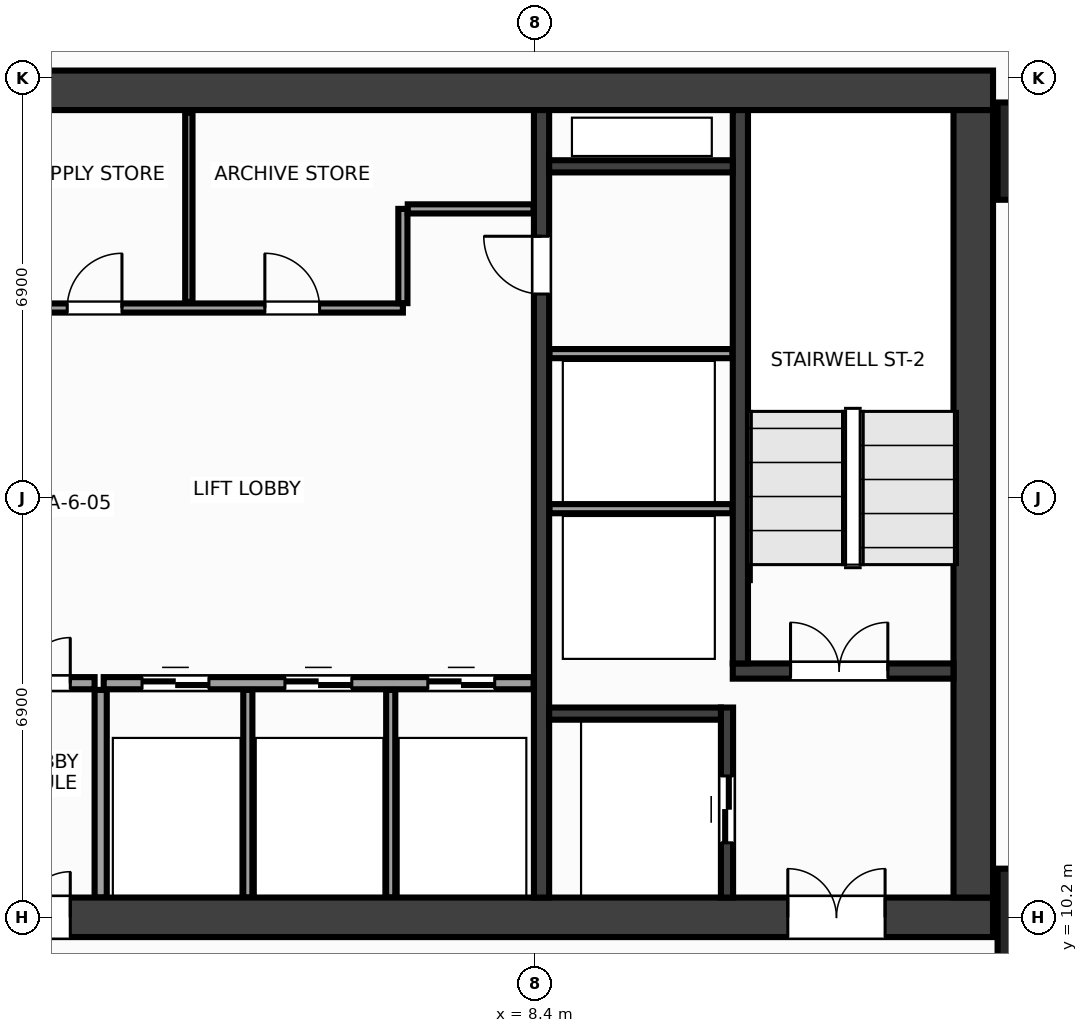
"""IFC4 building model, lengths in metres.
Left out: names, types, materials, properties, quantities, classifications, styles, units other than length and angle.
Written with IfcOpenShell. Run it as: python <this file> out.ifc"""

import sys

from ifc_helpers import new_model, si_unit, direction, frame, frame_2d, origin, origin_2d, place, context, subcontext, project, spatial, rectangle, extrude, source, transform, mapped, element, fill, save


model = new_model("IFC4")
c1 = context("Model", 3, precision=1e-05, world=origin(), true_north=direction((0.0, 1.0)))
c2 = subcontext(c1, "Body", "Model", "MODEL_VIEW")
j1 = project(units=[si_unit("LENGTHUNIT", "METRE"), si_unit("PLANEANGLEUNIT", "RADIAN")], contexts=[c1])
p1 = place(None, origin())
s1 = spatial("IfcSite", under=j1, at=p1, CompositionType="ELEMENT")
p2 = place(p1, origin())
s2 = spatial("IfcBuilding", under=s1, at=p2, CompositionType="ELEMENT")
p3 = place(p2, frame((0.0, 0.0, 185.6)))
s3 = spatial("IfcBuildingStorey", under=s2, at=p3, CompositionType="ELEMENT", Elevation=185.6)
m1 = source(origin(), c2, "Body", "SweptSolid", [
    extrude(rectangle(XDim=31.85, YDim=0.65, at=frame_2d((15.925, 0.0))), origin(), (0.0, 0.0, 1.0), 3.6),
])
p4 = place(p3, frame((-15.925, 23.8, 0.0), z_axis=(0.0, 0.0, 1.0), x_axis=(1.0, 0.0, 0.0)))
e1 = element("IfcWall", 1, at=p4, inside=s3, PredefinedType="SHEAR", context=c2, shape_type="MappedRepresentation", body=[
    mapped(m1, transform((0.0, 0.0, 0.0), x_axis=(1.0, 0.0, 0.0), y_axis=(0.0, 1.0, 0.0), z_axis=(0.0, 0.0, 1.0), scale=1.0)),
])
p5 = place(p3, frame((-15.925, 10.2, 0.0), z_axis=(0.0, 0.0, 1.0), x_axis=(1.0, 0.0, 0.0)))
e2 = element("IfcWall", 2, at=p5, inside=s3, PredefinedType="SHEAR", context=c2, shape_type="MappedRepresentation", body=[
    mapped(m1, transform((0.0, 0.0, 0.0), x_axis=(1.0, 0.0, 0.0), y_axis=(0.0, 1.0, 0.0), z_axis=(0.0, 0.0, 1.0), scale=1.0)),
])
p6 = place(p5, frame((1.775, 0.0, 0.0)))
e3 = element("IfcOpeningElement", 3, at=p6, cuts=e2, PredefinedType="OPENING", context=c2, shape_type="SweptSolid", body=[
    extrude(rectangle(XDim=1.6, YDim=2.15, at=frame_2d((0.8, 1.075))), frame((0.0, 0.337, 0.0), z_axis=(0.0, -1.0, 0.0), x_axis=(1.0, 0.0, 0.0)), (0.0, 0.0, 1.0), 0.674),
])
p7 = place(p5, frame((28.475, 0.0, 0.0)))
e4 = element("IfcOpeningElement", 4, at=p7, cuts=e2, PredefinedType="OPENING", context=c2, shape_type="SweptSolid", body=[
    extrude(rectangle(XDim=1.6, YDim=2.15, at=frame_2d((0.8, 1.075))), frame((0.0, 0.337, 0.0), z_axis=(0.0, -1.0, 0.0), x_axis=(1.0, 0.0, 0.0)), (0.0, 0.0, 1.0), 0.674),
])
p8 = place(p5, frame((15.175, 0.0, 0.0)))
e5 = element("IfcOpeningElement", 5, at=p8, cuts=e2, PredefinedType="OPENING", context=c2, shape_type="SweptSolid", body=[
    extrude(rectangle(XDim=1.5, YDim=2.2, at=frame_2d((0.75, 1.1))), frame((0.0, 0.337, 0.0), z_axis=(0.0, -1.0, 0.0), x_axis=(1.0, 0.0, 0.0)), (0.0, 0.0, 1.0), 0.674),
])
m2 = source(origin(), c2, "Body", "SweptSolid", [
    extrude(rectangle(XDim=12.95, YDim=0.65, at=frame_2d((6.475, 0.0))), origin(), (0.0, 0.0, 1.0), 3.6),
])
p9 = place(p3, frame((15.6, 10.525, 0.0), z_axis=(0.0, 0.0, 1.0), x_axis=(0.0, 1.0, 0.0)))
e6 = element("IfcWall", 6, at=p9, inside=s3, PredefinedType="SHEAR", context=c2, shape_type="MappedRepresentation", body=[
    mapped(m2, transform((0.0, 0.0, 0.0), x_axis=(1.0, 0.0, 0.0), y_axis=(0.0, 1.0, 0.0), z_axis=(0.0, 0.0, 1.0), scale=1.0)),
])
m3 = source(origin(), c2, "Body", "SweptSolid", [
    extrude(rectangle(XDim=12.95, YDim=0.25, at=frame_2d((6.475, 0.0))), origin(), (0.0, 0.0, 1.0), 3.6),
])
p10 = place(p3, frame((8.5, 10.525, 0.0), z_axis=(0.0, 0.0, 1.0), x_axis=(0.0, 1.0, 0.0)))
e7 = element("IfcWall", 7, at=p10, inside=s3, PredefinedType="SHEAR", context=c2, shape_type="MappedRepresentation", body=[
    mapped(m3, transform((0.0, 0.0, 0.0), x_axis=(1.0, 0.0, 0.0), y_axis=(0.0, 1.0, 0.0), z_axis=(0.0, 0.0, 1.0), scale=1.0)),
])
p11 = place(p10, frame((9.925, 0.0, 0.0)))
e8 = element("IfcOpeningElement", 8, at=p11, cuts=e7, PredefinedType="OPENING", context=c2, shape_type="SweptSolid", body=[
    extrude(rectangle(XDim=0.95, YDim=2.15, at=frame_2d((0.475, 1.075))), frame((0.0, 0.137, 0.0), z_axis=(0.0, -1.0, 0.0), x_axis=(1.0, 0.0, 0.0)), (0.0, 0.0, 1.0), 0.274),
])
m4 = source(origin(), c2, "Body", "SweptSolid", [
    extrude(rectangle(XDim=3.63, YDim=0.25, at=frame_2d((1.815, 0.0))), origin(), (0.0, 0.0, 1.0), 3.6),
])
p12 = place(p3, frame((11.645, 14.25, 0.0), z_axis=(0.0, 0.0, 1.0), x_axis=(1.0, 0.0, 0.0)))
e9 = element("IfcWall", 9, at=p12, inside=s3, PredefinedType="SHEAR", context=c2, shape_type="MappedRepresentation", body=[
    mapped(m4, transform((0.0, 0.0, 0.0), x_axis=(1.0, 0.0, 0.0), y_axis=(0.0, 1.0, 0.0), z_axis=(0.0, 0.0, 1.0), scale=1.0)),
])
p13 = place(p12, frame((0.95, 0.0, 0.0)))
e10 = element("IfcOpeningElement", 10, at=p13, cuts=e9, PredefinedType="OPENING", context=c2, shape_type="SweptSolid", body=[
    extrude(rectangle(XDim=1.6, YDim=2.15, at=frame_2d((0.8, 1.075))), frame((0.0, 0.137, 0.0), z_axis=(0.0, -1.0, 0.0), x_axis=(1.0, 0.0, 0.0)), (0.0, 0.0, 1.0), 0.274),
])
m5 = source(origin(), c2, "Body", "SweptSolid", [
    extrude(rectangle(XDim=9.1, YDim=0.25, at=frame_2d((4.55, 0.0))), origin(), (0.0, 0.0, 1.0), 3.6),
])
p14 = place(p3, frame((11.77, 14.375, 0.0), z_axis=(0.0, 0.0, 1.0), x_axis=(0.0, 1.0, 0.0)))
e11 = element("IfcWall", 11, at=p14, inside=s3, PredefinedType="SHEAR", context=c2, shape_type="MappedRepresentation", body=[
    mapped(m5, transform((0.0, 0.0, 0.0), x_axis=(1.0, 0.0, 0.0), y_axis=(0.0, 1.0, 0.0), z_axis=(0.0, 0.0, 1.0), scale=1.0)),
])
m6 = source(origin(), c2, "Body", "SweptSolid", [
    extrude(rectangle(XDim=3.125, YDim=0.2, at=frame_2d((1.562, 0.0))), origin(), (0.0, 0.0, 1.0), 3.6),
])
p15 = place(p3, frame((11.55, 10.525, 0.0), z_axis=(0.0, 0.0, 1.0), x_axis=(0.0, 1.0, 0.0)))
e12 = element("IfcWall", 12, at=p15, inside=s3, PredefinedType="SHEAR", context=c2, shape_type="MappedRepresentation", body=[
    mapped(m6, transform((0.0, 0.0, 0.0), x_axis=(1.0, 0.0, 0.0), y_axis=(0.0, 1.0, 0.0), z_axis=(0.0, 0.0, 1.0), scale=1.0)),
])
p16 = place(p15, frame((0.9, 0.0, 0.0)))
e13 = element("IfcOpeningElement", 13, at=p16, cuts=e12, PredefinedType="OPENING", context=c2, shape_type="SweptSolid", body=[
    extrude(rectangle(XDim=1.1, YDim=2.15, at=frame_2d((0.55, 1.075))), frame((0.0, 0.112, 0.0), z_axis=(0.0, -1.0, 0.0), x_axis=(1.0, 0.0, 0.0)), (0.0, 0.0, 1.0), 0.224),
])
m7 = source(origin(), c2, "Body", "SweptSolid", [
    extrude(rectangle(XDim=2.825, YDim=0.2, at=frame_2d((1.413, 0.0))), origin(), (0.0, 0.0, 1.0), 3.6),
])
p17 = place(p3, frame((8.625, 13.55, 0.0), z_axis=(0.0, 0.0, 1.0), x_axis=(1.0, 0.0, 0.0)))
e14 = element("IfcWall", 14, at=p17, inside=s3, PredefinedType="SHEAR", context=c2, shape_type="MappedRepresentation", body=[
    mapped(m7, transform((0.0, 0.0, 0.0), x_axis=(1.0, 0.0, 0.0), y_axis=(0.0, 1.0, 0.0), z_axis=(0.0, 0.0, 1.0), scale=1.0)),
])
m8 = source(origin(), c2, "Body", "SweptSolid", [
    extrude(rectangle(XDim=3.02, YDim=0.2, at=frame_2d((1.51, 0.0))), origin(), (0.0, 0.0, 1.0), 3.6),
])
p18 = place(p3, frame((8.625, 22.55, 0.0), z_axis=(0.0, 0.0, 1.0), x_axis=(1.0, 0.0, 0.0)))
e15 = element("IfcWall", 15, at=p18, inside=s3, PredefinedType="SHEAR", context=c2, shape_type="MappedRepresentation", body=[
    mapped(m8, transform((0.0, 0.0, 0.0), x_axis=(1.0, 0.0, 0.0), y_axis=(0.0, 1.0, 0.0), z_axis=(0.0, 0.0, 1.0), scale=1.0)),
])
m9 = source(origin(), c2, "Body", "SweptSolid", [
    extrude(rectangle(XDim=1.6, YDim=1.6, at=origin_2d()), origin(), (0.0, 0.0, 1.0), 3.6),
])
for number, where, z_axis, x_axis in (
    (16, (16.8, 10.2, 0.0), (0.0, 0.0, 1.0), (1.0, 0.0, 0.0)),
    (17, (16.8, 22.8, 0.0), (0.0, 0.0, 1.0), (1.0, 0.0, 0.0)),
):
    element("IfcColumn", number, at=place(p3, frame(where, z_axis=z_axis, x_axis=x_axis)), inside=s3, PredefinedType="COLUMN", context=c2, shape_type="MappedRepresentation", body=[
        mapped(m9, transform((0.0, 0.0, 0.0), x_axis=(1.0, 0.0, 0.0), y_axis=(0.0, 1.0, 0.0), z_axis=(0.0, 0.0, 1.0), scale=1.0)),
    ])
m10 = source(origin(), c2, "Body", "SweptSolid", [
    extrude(rectangle(XDim=3.01, YDim=0.15, at=frame_2d((1.505, 0.0))), origin(), (0.0, 0.0, 1.0), 3.3),
])
for number, where, z_axis, x_axis in (
    (18, (8.63, 16.92, 0.0), (0.0, 0.0, 1.0), (1.0, 0.0, 0.0)),
    (19, (8.63, 19.47, 0.0), (0.0, 0.0, 1.0), (1.0, 0.0, 0.0)),
):
    element("IfcWall", number, at=place(p3, frame(where, z_axis=z_axis, x_axis=x_axis)), inside=s3, PredefinedType="PARTITIONING", context=c2, shape_type="MappedRepresentation", body=[
        mapped(m10, transform((0.0, 0.0, 0.0), x_axis=(1.0, 0.0, 0.0), y_axis=(0.0, 1.0, 0.0), z_axis=(0.0, 0.0, 1.0), scale=1.0)),
    ])
m11 = source(origin(), c2, "Body", "SweptSolid", [
    extrude(rectangle(XDim=7.07, YDim=0.2, at=frame_2d((3.535, 0.0))), origin(), (0.0, 0.0, 1.0), 3.3),
])
p19 = place(p3, frame((1.3, 14.05, 0.0), z_axis=(0.0, 0.0, 1.0), x_axis=(1.0, 0.0, 0.0)))
e20 = element("IfcWall", 20, at=p19, inside=s3, PredefinedType="PARTITIONING", context=c2, shape_type="MappedRepresentation", body=[
    mapped(m11, transform((0.0, 0.0, 0.0), x_axis=(1.0, 0.0, 0.0), y_axis=(0.0, 1.0, 0.0), z_axis=(0.0, 0.0, 1.0), scale=1.0)),
])
p20 = place(p19, frame((0.63, 0.0, 0.0)))
e21 = element("IfcOpeningElement", 21, at=p20, cuts=e20, PredefinedType="OPENING", context=c2, shape_type="SweptSolid", body=[
    extrude(rectangle(XDim=1.1, YDim=2.15, at=frame_2d((0.55, 1.075))), frame((0.0, 0.112, 0.0), z_axis=(0.0, -1.0, 0.0), x_axis=(1.0, 0.0, 0.0)), (0.0, 0.0, 1.0), 0.224),
])
p21 = place(p19, frame((2.98, 0.0, 0.0)))
e22 = element("IfcOpeningElement", 22, at=p21, cuts=e20, PredefinedType="OPENING", context=c2, shape_type="SweptSolid", body=[
    extrude(rectangle(XDim=1.1, YDim=2.15, at=frame_2d((0.55, 1.075))), frame((0.0, 0.112, 0.0), z_axis=(0.0, -1.0, 0.0), x_axis=(1.0, 0.0, 0.0)), (0.0, 0.0, 1.0), 0.224),
])
p22 = place(p19, frame((5.33, 0.0, 0.0)))
e23 = element("IfcOpeningElement", 23, at=p22, cuts=e20, PredefinedType="OPENING", context=c2, shape_type="SweptSolid", body=[
    extrude(rectangle(XDim=1.1, YDim=2.15, at=frame_2d((0.55, 1.075))), frame((0.0, 0.112, 0.0), z_axis=(0.0, -1.0, 0.0), x_axis=(1.0, 0.0, 0.0)), (0.0, 0.0, 1.0), 0.224),
])
m12 = source(origin(), c2, "Body", "SweptSolid", [
    extrude(rectangle(XDim=3.415, YDim=0.2, at=frame_2d((1.708, 0.0))), origin(), (0.0, 0.0, 1.0), 3.3),
])
p23 = place(p3, frame((1.25, 10.525, 0.0), z_axis=(0.0, 0.0, 1.0), x_axis=(0.0, 1.0, 0.0)))
e24 = element("IfcWall", 24, at=p23, inside=s3, PredefinedType="PARTITIONING", context=c2, shape_type="MappedRepresentation", body=[
    mapped(m12, transform((0.0, 0.0, 0.0), x_axis=(1.0, 0.0, 0.0), y_axis=(0.0, 1.0, 0.0), z_axis=(0.0, 0.0, 1.0), scale=1.0)),
])
m13 = source(origin(), c2, "Body", "SweptSolid", [
    extrude(rectangle(XDim=2.3, YDim=0.2, at=frame_2d((1.15, 0.0))), origin(), (0.0, 0.0, 1.0), 3.3),
])
p24 = place(p3, frame((-1.15, 14.05, 0.0), z_axis=(0.0, 0.0, 1.0), x_axis=(1.0, 0.0, 0.0)))
e25 = element("IfcWall", 25, at=p24, inside=s3, PredefinedType="PARTITIONING", context=c2, shape_type="MappedRepresentation", body=[
    mapped(m13, transform((0.0, 0.0, 0.0), x_axis=(1.0, 0.0, 0.0), y_axis=(0.0, 1.0, 0.0), z_axis=(0.0, 0.0, 1.0), scale=1.0)),
])
p25 = place(p24, frame((0.4, 0.0, 0.0)))
e26 = element("IfcOpeningElement", 26, at=p25, cuts=e25, PredefinedType="OPENING", context=c2, shape_type="SweptSolid", body=[
    extrude(rectangle(XDim=1.5, YDim=2.2, at=frame_2d((0.75, 1.1))), frame((0.0, 0.112, 0.0), z_axis=(0.0, -1.0, 0.0), x_axis=(1.0, 0.0, 0.0)), (0.0, 0.0, 1.0), 0.224),
])
m14 = source(origin(), c2, "Body", "SweptSolid", [
    extrude(rectangle(XDim=14.59, YDim=0.15, at=frame_2d((7.295, 0.0))), origin(), (0.0, 0.0, 1.0), 3.3),
])
p26 = place(p3, frame((-8.37, 20.22, 0.0), z_axis=(0.0, 0.0, 1.0), x_axis=(1.0, 0.0, 0.0)))
e27 = element("IfcWall", 27, at=p26, inside=s3, PredefinedType="PARTITIONING", context=c2, shape_type="MappedRepresentation", body=[
    mapped(m14, transform((0.0, 0.0, 0.0), x_axis=(1.0, 0.0, 0.0), y_axis=(0.0, 1.0, 0.0), z_axis=(0.0, 0.0, 1.0), scale=1.0)),
])
p27 = place(p26, frame((0.86, 0.0, 0.0)))
e28 = element("IfcOpeningElement", 28, at=p27, cuts=e27, PredefinedType="OPENING", context=c2, shape_type="SweptSolid", body=[
    extrude(rectangle(XDim=0.9, YDim=2.15, at=frame_2d((0.45, 1.075))), frame((0.0, 0.087, 0.0), z_axis=(0.0, -1.0, 0.0), x_axis=(1.0, 0.0, 0.0)), (0.0, 0.0, 1.0), 0.174),
])
p28 = place(p26, frame((3.47, 0.0, 0.0)))
e29 = element("IfcOpeningElement", 29, at=p28, cuts=e27, PredefinedType="OPENING", context=c2, shape_type="SweptSolid", body=[
    extrude(rectangle(XDim=0.9, YDim=2.15, at=frame_2d((0.45, 1.075))), frame((0.0, 0.087, 0.0), z_axis=(0.0, -1.0, 0.0), x_axis=(1.0, 0.0, 0.0)), (0.0, 0.0, 1.0), 0.174),
])
p29 = place(p26, frame((6.17, 0.0, 0.0)))
e30 = element("IfcOpeningElement", 30, at=p29, cuts=e27, PredefinedType="OPENING", context=c2, shape_type="SweptSolid", body=[
    extrude(rectangle(XDim=0.9, YDim=2.15, at=frame_2d((0.45, 1.075))), frame((0.0, 0.087, 0.0), z_axis=(0.0, -1.0, 0.0), x_axis=(1.0, 0.0, 0.0)), (0.0, 0.0, 1.0), 0.174),
])
p30 = place(p26, frame((9.07, 0.0, 0.0)))
e31 = element("IfcOpeningElement", 31, at=p30, cuts=e27, PredefinedType="OPENING", context=c2, shape_type="SweptSolid", body=[
    extrude(rectangle(XDim=0.9, YDim=2.15, at=frame_2d((0.45, 1.075))), frame((0.0, 0.087, 0.0), z_axis=(0.0, -1.0, 0.0), x_axis=(1.0, 0.0, 0.0)), (0.0, 0.0, 1.0), 0.174),
])
p31 = place(p26, frame((12.32, 0.0, 0.0)))
e32 = element("IfcOpeningElement", 32, at=p31, cuts=e27, PredefinedType="OPENING", context=c2, shape_type="SweptSolid", body=[
    extrude(rectangle(XDim=0.9, YDim=2.15, at=frame_2d((0.45, 1.075))), frame((0.0, 0.087, 0.0), z_axis=(0.0, -1.0, 0.0), x_axis=(1.0, 0.0, 0.0)), (0.0, 0.0, 1.0), 0.174),
])
m15 = source(origin(), c2, "Body", "SweptSolid", [
    extrude(rectangle(XDim=1.55, YDim=0.15, at=frame_2d((0.775, 0.0))), origin(), (0.0, 0.0, 1.0), 3.3),
])
p32 = place(p3, frame((6.22, 20.3, 0.0), z_axis=(0.0, 0.0, 1.0), x_axis=(0.0, 1.0, 0.0)))
e33 = element("IfcWall", 33, at=p32, inside=s3, PredefinedType="PARTITIONING", context=c2, shape_type="MappedRepresentation", body=[
    mapped(m15, transform((0.0, 0.0, 0.0), x_axis=(1.0, 0.0, 0.0), y_axis=(0.0, 1.0, 0.0), z_axis=(0.0, 0.0, 1.0), scale=1.0)),
])
m16 = source(origin(), c2, "Body", "SweptSolid", [
    extrude(rectangle(XDim=2.07, YDim=0.15, at=frame_2d((1.035, 0.0))), origin(), (0.0, 0.0, 1.0), 3.3),
])
p33 = place(p3, frame((6.3, 21.85, 0.0), z_axis=(0.0, 0.0, 1.0), x_axis=(1.0, 0.0, 0.0)))
e34 = element("IfcWall", 34, at=p33, inside=s3, PredefinedType="PARTITIONING", context=c2, shape_type="MappedRepresentation", body=[
    mapped(m16, transform((0.0, 0.0, 0.0), x_axis=(1.0, 0.0, 0.0), y_axis=(0.0, 1.0, 0.0), z_axis=(0.0, 0.0, 1.0), scale=1.0)),
])
m17 = source(origin(), c2, "Body", "SweptSolid", [
    extrude(rectangle(XDim=3.415, YDim=0.15, at=frame_2d((1.708, 0.0))), origin(), (0.0, 0.0, 1.0), 3.3),
])
for number, where, z_axis, x_axis in (
    (35, (3.67, 10.525, 0.0), (0.0, 0.0, 1.0), (0.0, 1.0, 0.0)),
    (36, (6.02, 10.525, 0.0), (0.0, 0.0, 1.0), (0.0, 1.0, 0.0)),
):
    element("IfcWall", number, at=place(p3, frame(where, z_axis=z_axis, x_axis=x_axis)), inside=s3, PredefinedType="PARTITIONING", context=c2, shape_type="MappedRepresentation", body=[
        mapped(m17, transform((0.0, 0.0, 0.0), x_axis=(1.0, 0.0, 0.0), y_axis=(0.0, 1.0, 0.0), z_axis=(0.0, 0.0, 1.0), scale=1.0)),
    ])
m18 = source(origin(), c2, "Body", "SweptSolid", [
    extrude(rectangle(XDim=3.115, YDim=0.12, at=frame_2d((1.558, 0.0))), origin(), (0.0, 0.0, 1.0), 3.3),
])
p34 = place(p3, frame((2.7, 20.32, 0.0), z_axis=(0.0, 0.0, 1.0), x_axis=(0.0, 1.0, 0.0)))
e37 = element("IfcWall", 37, at=p34, inside=s3, PredefinedType="PARTITIONING", context=c2, shape_type="MappedRepresentation", body=[
    mapped(m18, transform((0.0, 0.0, 0.0), x_axis=(1.0, 0.0, 0.0), y_axis=(0.0, 1.0, 0.0), z_axis=(0.0, 0.0, 1.0), scale=1.0)),
])
m19 = source(origin(), c2, "Body", "SweptSolid", [
    extrude(rectangle(XDim=1.6, YDim=2.15, at=frame_2d((0.8, 1.075))), frame((0.0, 0.025, 0.0), z_axis=(0.0, -1.0, 0.0), x_axis=(1.0, 0.0, 0.0)), (0.0, 0.0, 1.0), 0.05),
])
p35 = place(p13, origin())
e38 = element("IfcDoor", 38, at=p35, inside=s3, OperationType="DOUBLE_DOOR_SINGLE_SWING", PredefinedType="DOOR", context=c2, shape_type="MappedRepresentation", body=[
    mapped(m19, transform((0.0, 0.0, 0.0), x_axis=(1.0, 0.0, 0.0), y_axis=(0.0, 1.0, 0.0), z_axis=(0.0, 0.0, 1.0), scale=1.0)),
])
fill(e10, e38)
p36 = place(p7, origin())
e39 = element("IfcDoor", 39, at=p36, inside=s3, OperationType="DOUBLE_DOOR_SINGLE_SWING", PredefinedType="DOOR", context=c2, shape_type="MappedRepresentation", body=[
    mapped(m19, transform((0.0, 0.0, 0.0), x_axis=(1.0, 0.0, 0.0), y_axis=(0.0, 1.0, 0.0), z_axis=(0.0, 0.0, 1.0), scale=1.0)),
])
fill(e4, e39)
m20 = source(origin(), c2, "Body", "SweptSolid", [
    extrude(rectangle(XDim=1.1, YDim=2.15, at=frame_2d((0.55, 1.075))), frame((0.0, 0.025, 0.0), z_axis=(0.0, -1.0, 0.0), x_axis=(1.0, 0.0, 0.0)), (0.0, 0.0, 1.0), 0.05),
])
p37 = place(p16, origin())
e40 = element("IfcDoor", 40, at=p37, inside=s3, OperationType="DOUBLE_DOOR_SLIDING", PredefinedType="DOOR", context=c2, shape_type="MappedRepresentation", body=[
    mapped(m20, transform((0.0, 0.0, 0.0), x_axis=(1.0, 0.0, 0.0), y_axis=(0.0, 1.0, 0.0), z_axis=(0.0, 0.0, 1.0), scale=1.0)),
])
fill(e13, e40)
m21 = source(origin(), c2, "Body", "SweptSolid", [
    extrude(rectangle(XDim=0.95, YDim=2.15, at=frame_2d((0.475, 1.075))), frame((0.0, 0.025, 0.0), z_axis=(0.0, -1.0, 0.0), x_axis=(1.0, 0.0, 0.0)), (0.0, 0.0, 1.0), 0.05),
])
p38 = place(p11, origin())
e41 = element("IfcDoor", 41, at=p38, inside=s3, OperationType="SINGLE_SWING_RIGHT", PredefinedType="DOOR", context=c2, shape_type="MappedRepresentation", body=[
    mapped(m21, transform((0.0, 0.0, 0.0), x_axis=(1.0, 0.0, 0.0), y_axis=(0.0, 1.0, 0.0), z_axis=(0.0, 0.0, 1.0), scale=1.0)),
])
fill(e8, e41)
p39 = place(p20, origin())
e42 = element("IfcDoor", 42, at=p39, inside=s3, OperationType="DOUBLE_DOOR_SLIDING", PredefinedType="DOOR", context=c2, shape_type="MappedRepresentation", body=[
    mapped(m20, transform((0.0, 0.0, 0.0), x_axis=(1.0, 0.0, 0.0), y_axis=(0.0, 1.0, 0.0), z_axis=(0.0, 0.0, 1.0), scale=1.0)),
])
fill(e21, e42)
p40 = place(p21, origin())
e43 = element("IfcDoor", 43, at=p40, inside=s3, OperationType="DOUBLE_DOOR_SLIDING", PredefinedType="DOOR", context=c2, shape_type="MappedRepresentation", body=[
    mapped(m20, transform((0.0, 0.0, 0.0), x_axis=(1.0, 0.0, 0.0), y_axis=(0.0, 1.0, 0.0), z_axis=(0.0, 0.0, 1.0), scale=1.0)),
])
fill(e22, e43)
p41 = place(p22, origin())
e44 = element("IfcDoor", 44, at=p41, inside=s3, OperationType="DOUBLE_DOOR_SLIDING", PredefinedType="DOOR", context=c2, shape_type="MappedRepresentation", body=[
    mapped(m20, transform((0.0, 0.0, 0.0), x_axis=(1.0, 0.0, 0.0), y_axis=(0.0, 1.0, 0.0), z_axis=(0.0, 0.0, 1.0), scale=1.0)),
])
fill(e23, e44)
m22 = source(origin(), c2, "Body", "SweptSolid", [
    extrude(rectangle(XDim=1.5, YDim=2.2, at=frame_2d((0.75, 1.1))), frame((0.0, 0.025, 0.0), z_axis=(0.0, -1.0, 0.0), x_axis=(1.0, 0.0, 0.0)), (0.0, 0.0, 1.0), 0.05),
])
p42 = place(p25, origin())
e45 = element("IfcDoor", 45, at=p42, inside=s3, OperationType="DOUBLE_DOOR_SINGLE_SWING", PredefinedType="DOOR", context=c2, shape_type="MappedRepresentation", body=[
    mapped(m22, transform((0.0, 0.0, 0.0), x_axis=(1.0, 0.0, 0.0), y_axis=(0.0, 1.0, 0.0), z_axis=(0.0, 0.0, 1.0), scale=1.0)),
])
fill(e26, e45)
p43 = place(p8, origin())
e46 = element("IfcDoor", 46, at=p43, inside=s3, OperationType="DOUBLE_DOOR_SINGLE_SWING", PredefinedType="DOOR", context=c2, shape_type="MappedRepresentation", body=[
    mapped(m22, transform((0.0, 0.0, 0.0), x_axis=(1.0, 0.0, 0.0), y_axis=(0.0, 1.0, 0.0), z_axis=(0.0, 0.0, 1.0), scale=1.0)),
])
fill(e5, e46)
m23 = source(origin(), c2, "Body", "SweptSolid", [
    extrude(rectangle(XDim=0.9, YDim=2.15, at=frame_2d((0.45, 1.075))), frame((0.0, 0.025, 0.0), z_axis=(0.0, -1.0, 0.0), x_axis=(1.0, 0.0, 0.0)), (0.0, 0.0, 1.0), 0.05),
])
p44 = place(p30, origin())
e47 = element("IfcDoor", 47, at=p44, inside=s3, OperationType="SINGLE_SWING_RIGHT", PredefinedType="DOOR", context=c2, shape_type="MappedRepresentation", body=[
    mapped(m23, transform((0.0, 0.0, 0.0), x_axis=(1.0, 0.0, 0.0), y_axis=(0.0, 1.0, 0.0), z_axis=(0.0, 0.0, 1.0), scale=1.0)),
])
fill(e31, e47)
p45 = place(p31, origin())
e48 = element("IfcDoor", 48, at=p45, inside=s3, OperationType="SINGLE_SWING_LEFT", PredefinedType="DOOR", context=c2, shape_type="MappedRepresentation", body=[
    mapped(m23, transform((0.0, 0.0, 0.0), x_axis=(1.0, 0.0, 0.0), y_axis=(0.0, 1.0, 0.0), z_axis=(0.0, 0.0, 1.0), scale=1.0)),
])
fill(e32, e48)
save(model, sys.argv[1])
